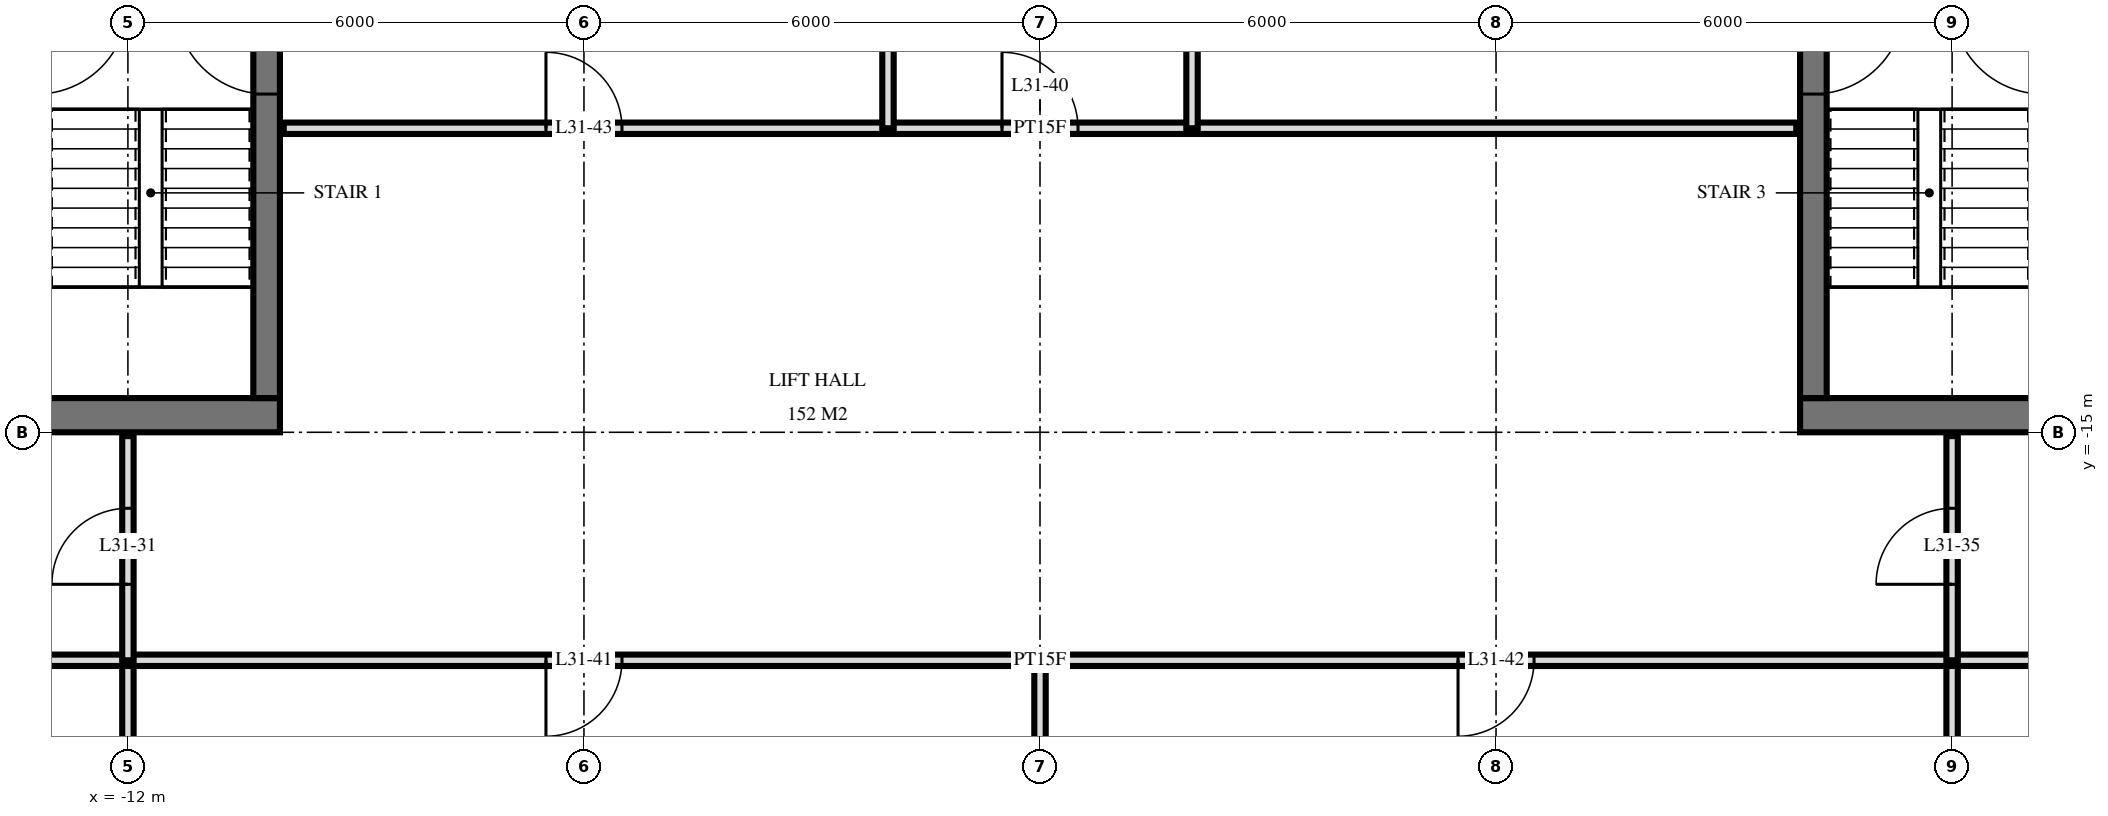
"""IFC4 building model, lengths in metres.
Left out: names, types, materials, properties, quantities, classifications, styles, units other than length and angle.
Written with IfcOpenShell. Run it as: python <this file> out.ifc"""

import sys

from ifc_helpers import new_model, si_unit, direction, frame, frame_2d, origin, place, context, subcontext, project, spatial, rectangle, extrude, element, fill, save


model = new_model("IFC4")
c1 = context("Model", 3, precision=1e-05, world=origin(), true_north=direction((0.0, 1.0)))
c2 = subcontext(c1, "Body", "Model", "MODEL_VIEW")
j1 = project(units=[si_unit("LENGTHUNIT", "METRE"), si_unit("PLANEANGLEUNIT", "RADIAN")], contexts=[c1])
p1 = place(None, origin())
s1 = spatial("IfcSite", under=j1, at=p1, CompositionType="ELEMENT")
p2 = place(p1, origin())
s2 = spatial("IfcBuilding", under=s1, at=p2, CompositionType="ELEMENT")
p3 = place(p2, frame((0.0, 0.0, 123.6)))
s3 = spatial("IfcBuildingStorey", under=s2, at=p3, CompositionType="ELEMENT", Elevation=123.6)
p4 = place(p3, frame((-24.5, -14.775, 0.0), z_axis=(0.0, 0.0, 1.0), x_axis=(1.0, 0.0, 0.0)))
e1 = element("IfcWall", 1, at=p4, inside=s3, PredefinedType="SHEAR", context=c2, shape_type="SweptSolid", body=[
    extrude(rectangle(XDim=14.5, YDim=0.45, at=frame_2d((7.25, 0.0))), origin(), (0.0, 0.0, 1.0), 3.6),
])
p5 = place(p4, frame((6.2, 0.0, 0.0)))
e2 = element("IfcOpeningElement", 2, at=p5, cuts=e1, PredefinedType="OPENING", context=c2, shape_type="SweptSolid", body=[
    extrude(rectangle(XDim=1.2, YDim=2.1, at=frame_2d((0.6, 1.05))), frame((0.0, 0.235, 0.0), z_axis=(0.0, -1.0, 0.0), x_axis=(1.0, 0.0, 0.0)), (0.0, 0.0, 1.0), 0.47),
])
p6 = place(p4, frame((9.25, 0.0, 0.0)))
e3 = element("IfcOpeningElement", 3, at=p6, cuts=e1, PredefinedType="OPENING", context=c2, shape_type="SweptSolid", body=[
    extrude(rectangle(XDim=1.1, YDim=2.1, at=frame_2d((0.55, 1.05))), frame((0.0, 0.235, 0.0), z_axis=(0.0, -1.0, 0.0), x_axis=(1.0, 0.0, 0.0)), (0.0, 0.0, 1.0), 0.47),
])
p7 = place(p4, frame((3.5, 0.0, 0.0)))
e4 = element("IfcOpeningElement", 4, at=p7, cuts=e1, PredefinedType="OPENING", context=c2, shape_type="SweptSolid", body=[
    extrude(rectangle(XDim=0.9, YDim=2.1, at=frame_2d((0.45, 1.05))), frame((0.0, 0.235, 0.0), z_axis=(0.0, -1.0, 0.0), x_axis=(1.0, 0.0, 0.0)), (0.0, 0.0, 1.0), 0.47),
])
p8 = place(p4, frame((1.05, 0.0, 0.0)))
e5 = element("IfcOpeningElement", 5, at=p8, cuts=e1, PredefinedType="OPENING", context=c2, shape_type="SweptSolid", body=[
    extrude(rectangle(XDim=1.0, YDim=2.1, at=frame_2d((0.5, 1.05))), frame((0.0, 0.235, 0.0), z_axis=(0.0, -1.0, 0.0), x_axis=(1.0, 0.0, 0.0)), (0.0, 0.0, 1.0), 0.47),
])
p9 = place(p3, frame((-10.175, -14.55, 0.0), z_axis=(0.0, 0.0, 1.0), x_axis=(0.0, 1.0, 0.0)))
e6 = element("IfcWall", 6, at=p9, inside=s3, PredefinedType="SHEAR", context=c2, shape_type="SweptSolid", body=[
    extrude(rectangle(XDim=14.1, YDim=0.35, at=frame_2d((7.05, 0.0))), origin(), (0.0, 0.0, 1.0), 3.6),
])
p10 = place(p9, frame((8.4, 0.0, 0.0)))
e7 = element("IfcOpeningElement", 7, at=p10, cuts=e6, PredefinedType="OPENING", context=c2, shape_type="SweptSolid", body=[
    extrude(rectangle(XDim=1.4, YDim=2.4, at=frame_2d((0.7, 1.2))), frame((0.0, 0.185, 0.0), z_axis=(0.0, -1.0, 0.0), x_axis=(1.0, 0.0, 0.0)), (0.0, 0.0, 1.0), 0.37),
])
p11 = place(p9, frame((10.0, 0.0, 0.0)))
e8 = element("IfcOpeningElement", 8, at=p11, cuts=e6, PredefinedType="OPENING", context=c2, shape_type="SweptSolid", body=[
    extrude(rectangle(XDim=1.4, YDim=2.4, at=frame_2d((0.7, 1.2))), frame((0.0, 0.185, 0.0), z_axis=(0.0, -1.0, 0.0), x_axis=(1.0, 0.0, 0.0)), (0.0, 0.0, 1.0), 0.37),
])
p12 = place(p9, frame((4.0, 0.0, 0.0)))
e9 = element("IfcOpeningElement", 9, at=p12, cuts=e6, PredefinedType="OPENING", context=c2, shape_type="SweptSolid", body=[
    extrude(rectangle(XDim=1.2, YDim=2.1, at=frame_2d((0.6, 1.05))), frame((0.0, 0.185, 0.0), z_axis=(0.0, -1.0, 0.0), x_axis=(1.0, 0.0, 0.0)), (0.0, 0.0, 1.0), 0.37),
])
p13 = place(p3, frame((10.0, -14.775, 0.0), z_axis=(0.0, 0.0, 1.0), x_axis=(1.0, 0.0, 0.0)))
e10 = element("IfcWall", 10, at=p13, inside=s3, PredefinedType="SHEAR", context=c2, shape_type="SweptSolid", body=[
    extrude(rectangle(XDim=14.5, YDim=0.45, at=frame_2d((7.25, 0.0))), origin(), (0.0, 0.0, 1.0), 3.6),
])
p14 = place(p13, frame((7.1, 0.0, 0.0)))
e11 = element("IfcOpeningElement", 11, at=p14, cuts=e10, PredefinedType="OPENING", context=c2, shape_type="SweptSolid", body=[
    extrude(rectangle(XDim=1.2, YDim=2.1, at=frame_2d((0.6, 1.05))), frame((0.0, 0.235, 0.0), z_axis=(0.0, -1.0, 0.0), x_axis=(1.0, 0.0, 0.0)), (0.0, 0.0, 1.0), 0.47),
])
p15 = place(p13, frame((4.15, 0.0, 0.0)))
e12 = element("IfcOpeningElement", 12, at=p15, cuts=e10, PredefinedType="OPENING", context=c2, shape_type="SweptSolid", body=[
    extrude(rectangle(XDim=1.1, YDim=2.1, at=frame_2d((0.55, 1.05))), frame((0.0, 0.235, 0.0), z_axis=(0.0, -1.0, 0.0), x_axis=(1.0, 0.0, 0.0)), (0.0, 0.0, 1.0), 0.47),
])
p16 = place(p13, frame((10.1, 0.0, 0.0)))
e13 = element("IfcOpeningElement", 13, at=p16, cuts=e10, PredefinedType="OPENING", context=c2, shape_type="SweptSolid", body=[
    extrude(rectangle(XDim=0.9, YDim=2.1, at=frame_2d((0.45, 1.05))), frame((0.0, 0.235, 0.0), z_axis=(0.0, -1.0, 0.0), x_axis=(1.0, 0.0, 0.0)), (0.0, 0.0, 1.0), 0.47),
])
p17 = place(p13, frame((12.45, 0.0, 0.0)))
e14 = element("IfcOpeningElement", 14, at=p17, cuts=e10, PredefinedType="OPENING", context=c2, shape_type="SweptSolid", body=[
    extrude(rectangle(XDim=1.0, YDim=2.1, at=frame_2d((0.5, 1.05))), frame((0.0, 0.235, 0.0), z_axis=(0.0, -1.0, 0.0), x_axis=(1.0, 0.0, 0.0)), (0.0, 0.0, 1.0), 0.47),
])
p18 = place(p3, frame((10.175, -14.55, 0.0), z_axis=(0.0, 0.0, 1.0), x_axis=(0.0, 1.0, 0.0)))
e15 = element("IfcWall", 15, at=p18, inside=s3, PredefinedType="SHEAR", context=c2, shape_type="SweptSolid", body=[
    extrude(rectangle(XDim=14.1, YDim=0.35, at=frame_2d((7.05, 0.0))), origin(), (0.0, 0.0, 1.0), 3.6),
])
p19 = place(p18, frame((8.4, 0.0, 0.0)))
e16 = element("IfcOpeningElement", 16, at=p19, cuts=e15, PredefinedType="OPENING", context=c2, shape_type="SweptSolid", body=[
    extrude(rectangle(XDim=1.4, YDim=2.4, at=frame_2d((0.7, 1.2))), frame((0.0, 0.185, 0.0), z_axis=(0.0, -1.0, 0.0), x_axis=(1.0, 0.0, 0.0)), (0.0, 0.0, 1.0), 0.37),
])
p20 = place(p18, frame((10.0, 0.0, 0.0)))
e17 = element("IfcOpeningElement", 17, at=p20, cuts=e15, PredefinedType="OPENING", context=c2, shape_type="SweptSolid", body=[
    extrude(rectangle(XDim=1.4, YDim=2.4, at=frame_2d((0.7, 1.2))), frame((0.0, 0.185, 0.0), z_axis=(0.0, -1.0, 0.0), x_axis=(1.0, 0.0, 0.0)), (0.0, 0.0, 1.0), 0.37),
])
p21 = place(p18, frame((4.0, 0.0, 0.0)))
e18 = element("IfcOpeningElement", 18, at=p21, cuts=e15, PredefinedType="OPENING", context=c2, shape_type="SweptSolid", body=[
    extrude(rectangle(XDim=1.2, YDim=2.1, at=frame_2d((0.6, 1.05))), frame((0.0, 0.185, 0.0), z_axis=(0.0, -1.0, 0.0), x_axis=(1.0, 0.0, 0.0)), (0.0, 0.0, 1.0), 0.37),
])
p22 = place(p3, frame((12.0, -18.0, 0.0), z_axis=(0.0, 0.0, 1.0), x_axis=(0.0, 1.0, 0.0)))
e19 = element("IfcWall", 19, at=p22, inside=s3, PredefinedType="PARTITIONING", context=c2, shape_type="SweptSolid", body=[
    extrude(rectangle(XDim=2.95, YDim=0.15, at=frame_2d((1.475, 0.0))), origin(), (0.0, 0.0, 1.0), 3.32),
])
p23 = place(p22, frame((1.0, 0.0, 0.0)))
e20 = element("IfcOpeningElement", 20, at=p23, cuts=e19, PredefinedType="OPENING", context=c2, shape_type="SweptSolid", body=[
    extrude(rectangle(XDim=1.0, YDim=2.1, at=frame_2d((0.5, 1.05))), frame((0.0, 0.085, 0.0), z_axis=(0.0, -1.0, 0.0), x_axis=(1.0, 0.0, 0.0)), (0.0, 0.0, 1.0), 0.17),
])
p24 = place(p3, frame((12.0, -33.62, 0.0), z_axis=(0.0, 0.0, 1.0), x_axis=(0.0, 1.0, 0.0)))
e21 = element("IfcWall", 21, at=p24, inside=s3, PredefinedType="PARTITIONING", context=c2, shape_type="SweptSolid", body=[
    extrude(rectangle(XDim=15.62, YDim=0.15, at=frame_2d((7.81, 0.0))), origin(), (0.0, 0.0, 1.0), 3.32),
])
p25 = place(p3, frame((2.0, -11.0, 0.0), z_axis=(0.0, 0.0, 1.0), x_axis=(0.0, 1.0, 0.0)))
e22 = element("IfcWall", 22, at=p25, inside=s3, PredefinedType="PARTITIONING", context=c2, shape_type="SweptSolid", body=[
    extrude(rectangle(XDim=4.0, YDim=0.15, at=frame_2d((2.0, 0.0))), origin(), (0.0, 0.0, 1.0), 3.32),
])
p26 = place(p3, frame((0.0, -33.62, 0.0), z_axis=(0.0, 0.0, 1.0), x_axis=(0.0, 1.0, 0.0)))
e23 = element("IfcWall", 23, at=p26, inside=s3, PredefinedType="PARTITIONING", context=c2, shape_type="SweptSolid", body=[
    extrude(rectangle(XDim=15.62, YDim=0.15, at=frame_2d((7.81, 0.0))), origin(), (0.0, 0.0, 1.0), 3.32),
])
p27 = place(p3, frame((-2.0, -11.0, 0.0), z_axis=(0.0, 0.0, 1.0), x_axis=(0.0, 1.0, 0.0)))
e24 = element("IfcWall", 24, at=p27, inside=s3, PredefinedType="PARTITIONING", context=c2, shape_type="SweptSolid", body=[
    extrude(rectangle(XDim=4.0, YDim=0.15, at=frame_2d((2.0, 0.0))), origin(), (0.0, 0.0, 1.0), 3.32),
])
p28 = place(p3, frame((-12.0, -18.0, 0.0), z_axis=(0.0, 0.0, 1.0), x_axis=(0.0, 1.0, 0.0)))
e25 = element("IfcWall", 25, at=p28, inside=s3, PredefinedType="PARTITIONING", context=c2, shape_type="SweptSolid", body=[
    extrude(rectangle(XDim=2.95, YDim=0.15, at=frame_2d((1.475, 0.0))), origin(), (0.0, 0.0, 1.0), 3.32),
])
p29 = place(p28, frame((1.0, 0.0, 0.0)))
e26 = element("IfcOpeningElement", 26, at=p29, cuts=e25, PredefinedType="OPENING", context=c2, shape_type="SweptSolid", body=[
    extrude(rectangle(XDim=1.0, YDim=2.1, at=frame_2d((0.5, 1.05))), frame((0.0, 0.085, 0.0), z_axis=(0.0, -1.0, 0.0), x_axis=(1.0, 0.0, 0.0)), (0.0, 0.0, 1.0), 0.17),
])
p30 = place(p3, frame((-12.0, -33.62, 0.0), z_axis=(0.0, 0.0, 1.0), x_axis=(0.0, 1.0, 0.0)))
e27 = element("IfcWall", 27, at=p30, inside=s3, PredefinedType="PARTITIONING", context=c2, shape_type="SweptSolid", body=[
    extrude(rectangle(XDim=15.62, YDim=0.15, at=frame_2d((7.81, 0.0))), origin(), (0.0, 0.0, 1.0), 3.32),
])
p31 = place(p3, frame((-28.02, -18.0, 0.0), z_axis=(0.0, 0.0, 1.0), x_axis=(1.0, 0.0, 0.0)))
e28 = element("IfcWall", 28, at=p31, inside=s3, PredefinedType="PARTITIONING", context=c2, shape_type="SweptSolid", body=[
    extrude(rectangle(XDim=56.04, YDim=0.15, at=frame_2d((28.02, 0.0))), origin(), (0.0, 0.0, 1.0), 3.32),
])
p32 = place(p31, frame((13.17, 0.0, 0.0)))
e29 = element("IfcOpeningElement", 29, at=p32, cuts=e28, PredefinedType="OPENING", context=c2, shape_type="SweptSolid", body=[
    extrude(rectangle(XDim=1.0, YDim=2.1, at=frame_2d((0.5, 1.05))), frame((0.0, 0.085, 0.0), z_axis=(0.0, -1.0, 0.0), x_axis=(1.0, 0.0, 0.0)), (0.0, 0.0, 1.0), 0.17),
])
p33 = place(p31, frame((11.32, 0.0, 0.0)))
e30 = element("IfcOpeningElement", 30, at=p33, cuts=e28, PredefinedType="OPENING", context=c2, shape_type="SweptSolid", body=[
    extrude(rectangle(XDim=1.0, YDim=2.1, at=frame_2d((0.5, 1.05))), frame((0.0, 0.085, 0.0), z_axis=(0.0, -1.0, 0.0), x_axis=(1.0, 0.0, 0.0)), (0.0, 0.0, 1.0), 0.17),
])
p34 = place(p31, frame((41.87, 0.0, 0.0)))
e31 = element("IfcOpeningElement", 31, at=p34, cuts=e28, PredefinedType="OPENING", context=c2, shape_type="SweptSolid", body=[
    extrude(rectangle(XDim=1.0, YDim=2.1, at=frame_2d((0.5, 1.05))), frame((0.0, 0.085, 0.0), z_axis=(0.0, -1.0, 0.0), x_axis=(1.0, 0.0, 0.0)), (0.0, 0.0, 1.0), 0.17),
])
p35 = place(p31, frame((43.17, 0.0, 0.0)))
e32 = element("IfcOpeningElement", 32, at=p35, cuts=e28, PredefinedType="OPENING", context=c2, shape_type="SweptSolid", body=[
    extrude(rectangle(XDim=1.0, YDim=2.1, at=frame_2d((0.5, 1.05))), frame((0.0, 0.085, 0.0), z_axis=(0.0, -1.0, 0.0), x_axis=(1.0, 0.0, 0.0)), (0.0, 0.0, 1.0), 0.17),
])
p36 = place(p31, frame((46.72, 0.0, 0.0)))
e33 = element("IfcOpeningElement", 33, at=p36, cuts=e28, PredefinedType="OPENING", context=c2, shape_type="SweptSolid", body=[
    extrude(rectangle(XDim=1.0, YDim=2.1, at=frame_2d((0.5, 1.05))), frame((0.0, 0.085, 0.0), z_axis=(0.0, -1.0, 0.0), x_axis=(1.0, 0.0, 0.0)), (0.0, 0.0, 1.0), 0.17),
])
p37 = place(p31, frame((21.52, 0.0, 0.0)))
e34 = element("IfcOpeningElement", 34, at=p37, cuts=e28, PredefinedType="OPENING", context=c2, shape_type="SweptSolid", body=[
    extrude(rectangle(XDim=1.0, YDim=2.1, at=frame_2d((0.5, 1.05))), frame((0.0, 0.085, 0.0), z_axis=(0.0, -1.0, 0.0), x_axis=(1.0, 0.0, 0.0)), (0.0, 0.0, 1.0), 0.17),
])
p38 = place(p31, frame((33.52, 0.0, 0.0)))
e35 = element("IfcOpeningElement", 35, at=p38, cuts=e28, PredefinedType="OPENING", context=c2, shape_type="SweptSolid", body=[
    extrude(rectangle(XDim=1.0, YDim=2.1, at=frame_2d((0.5, 1.05))), frame((0.0, 0.085, 0.0), z_axis=(0.0, -1.0, 0.0), x_axis=(1.0, 0.0, 0.0)), (0.0, 0.0, 1.0), 0.17),
])
p39 = place(p3, frame((-9.95, -11.0, 0.0), z_axis=(0.0, 0.0, 1.0), x_axis=(1.0, 0.0, 0.0)))
e36 = element("IfcWall", 36, at=p39, inside=s3, PredefinedType="PARTITIONING", context=c2, shape_type="SweptSolid", body=[
    extrude(rectangle(XDim=19.9, YDim=0.15, at=frame_2d((9.95, 0.0))), origin(), (0.0, 0.0, 1.0), 3.32),
])
p40 = place(p39, frame((9.45, 0.0, 0.0)))
e37 = element("IfcOpeningElement", 37, at=p40, cuts=e36, PredefinedType="OPENING", context=c2, shape_type="SweptSolid", body=[
    extrude(rectangle(XDim=1.0, YDim=2.1, at=frame_2d((0.5, 1.05))), frame((0.0, 0.085, 0.0), z_axis=(0.0, -1.0, 0.0), x_axis=(1.0, 0.0, 0.0)), (0.0, 0.0, 1.0), 0.17),
])
p41 = place(p39, frame((3.45, 0.0, 0.0)))
e38 = element("IfcOpeningElement", 38, at=p41, cuts=e36, PredefinedType="OPENING", context=c2, shape_type="SweptSolid", body=[
    extrude(rectangle(XDim=1.0, YDim=2.1, at=frame_2d((0.5, 1.05))), frame((0.0, 0.085, 0.0), z_axis=(0.0, -1.0, 0.0), x_axis=(1.0, 0.0, 0.0)), (0.0, 0.0, 1.0), 0.17),
])
p42 = place(p12, origin())
e39 = element("IfcDoor", 39, at=p42, inside=s3, OperationType="SINGLE_SWING_LEFT", PredefinedType="DOOR", context=c2, shape_type="SweptSolid", body=[
    extrude(rectangle(XDim=1.2, YDim=2.1, at=frame_2d((0.6, 1.05))), frame((0.0, 0.025, 0.0), z_axis=(0.0, -1.0, 0.0), x_axis=(1.0, 0.0, 0.0)), (0.0, 0.0, 1.0), 0.05),
])
fill(e9, e39)
p43 = place(p21, frame((0.6, 0.0, 0.0), z_axis=(0.0, 0.0, 1.0), x_axis=(-1.0, 0.0, 0.0)))
e40 = element("IfcDoor", 40, at=p43, inside=s3, OperationType="SINGLE_SWING_RIGHT", PredefinedType="DOOR", context=c2, shape_type="SweptSolid", body=[
    extrude(rectangle(XDim=1.2, YDim=2.1, at=frame_2d((0.0, 1.05))), frame((0.0, -0.025, 0.0), z_axis=(0.0, 1.0, 0.0), x_axis=(-1.0, 0.0, 0.0)), (0.0, 0.0, 1.0), 0.05),
])
fill(e18, e40)
p44 = place(p29, origin())
e41 = element("IfcDoor", 41, at=p44, inside=s3, OperationType="SINGLE_SWING_RIGHT", PredefinedType="DOOR", context=c2, shape_type="SweptSolid", body=[
    extrude(rectangle(XDim=1.0, YDim=2.1, at=frame_2d((0.5, 1.05))), frame((0.0, 0.025, 0.0), z_axis=(0.0, -1.0, 0.0), x_axis=(1.0, 0.0, 0.0)), (0.0, 0.0, 1.0), 0.05),
])
fill(e26, e41)
p45 = place(p23, origin())
e42 = element("IfcDoor", 42, at=p45, inside=s3, OperationType="SINGLE_SWING_RIGHT", PredefinedType="DOOR", context=c2, shape_type="SweptSolid", body=[
    extrude(rectangle(XDim=1.0, YDim=2.1, at=frame_2d((0.5, 1.05))), frame((0.0, 0.025, 0.0), z_axis=(0.0, -1.0, 0.0), x_axis=(1.0, 0.0, 0.0)), (0.0, 0.0, 1.0), 0.05),
])
fill(e20, e42)
p46 = place(p40, origin())
e43 = element("IfcDoor", 43, at=p46, inside=s3, OperationType="SINGLE_SWING_RIGHT", PredefinedType="DOOR", context=c2, shape_type="SweptSolid", body=[
    extrude(rectangle(XDim=1.0, YDim=2.1, at=frame_2d((0.5, 1.05))), frame((0.0, 0.025, 0.0), z_axis=(0.0, -1.0, 0.0), x_axis=(1.0, 0.0, 0.0)), (0.0, 0.0, 1.0), 0.05),
])
fill(e37, e43)
p47 = place(p37, frame((0.5, 0.0, 0.0), z_axis=(0.0, 0.0, 1.0), x_axis=(-1.0, 0.0, 0.0)))
e44 = element("IfcDoor", 44, at=p47, inside=s3, OperationType="SINGLE_SWING_LEFT", PredefinedType="DOOR", context=c2, shape_type="SweptSolid", body=[
    extrude(rectangle(XDim=1.0, YDim=2.1, at=frame_2d((0.0, 1.05))), frame((0.0, -0.025, 0.0), z_axis=(0.0, 1.0, 0.0), x_axis=(-1.0, 0.0, 0.0)), (0.0, 0.0, 1.0), 0.05),
])
fill(e34, e44)
p48 = place(p38, frame((0.5, 0.0, 0.0), z_axis=(0.0, 0.0, 1.0), x_axis=(-1.0, 0.0, 0.0)))
e45 = element("IfcDoor", 45, at=p48, inside=s3, OperationType="SINGLE_SWING_LEFT", PredefinedType="DOOR", context=c2, shape_type="SweptSolid", body=[
    extrude(rectangle(XDim=1.0, YDim=2.1, at=frame_2d((0.0, 1.05))), frame((0.0, -0.025, 0.0), z_axis=(0.0, 1.0, 0.0), x_axis=(-1.0, 0.0, 0.0)), (0.0, 0.0, 1.0), 0.05),
])
fill(e35, e45)
p49 = place(p41, origin())
e46 = element("IfcDoor", 46, at=p49, inside=s3, OperationType="SINGLE_SWING_RIGHT", PredefinedType="DOOR", context=c2, shape_type="SweptSolid", body=[
    extrude(rectangle(XDim=1.0, YDim=2.1, at=frame_2d((0.5, 1.05))), frame((0.0, 0.025, 0.0), z_axis=(0.0, -1.0, 0.0), x_axis=(1.0, 0.0, 0.0)), (0.0, 0.0, 1.0), 0.05),
])
fill(e38, e46)
save(model, sys.argv[1])
